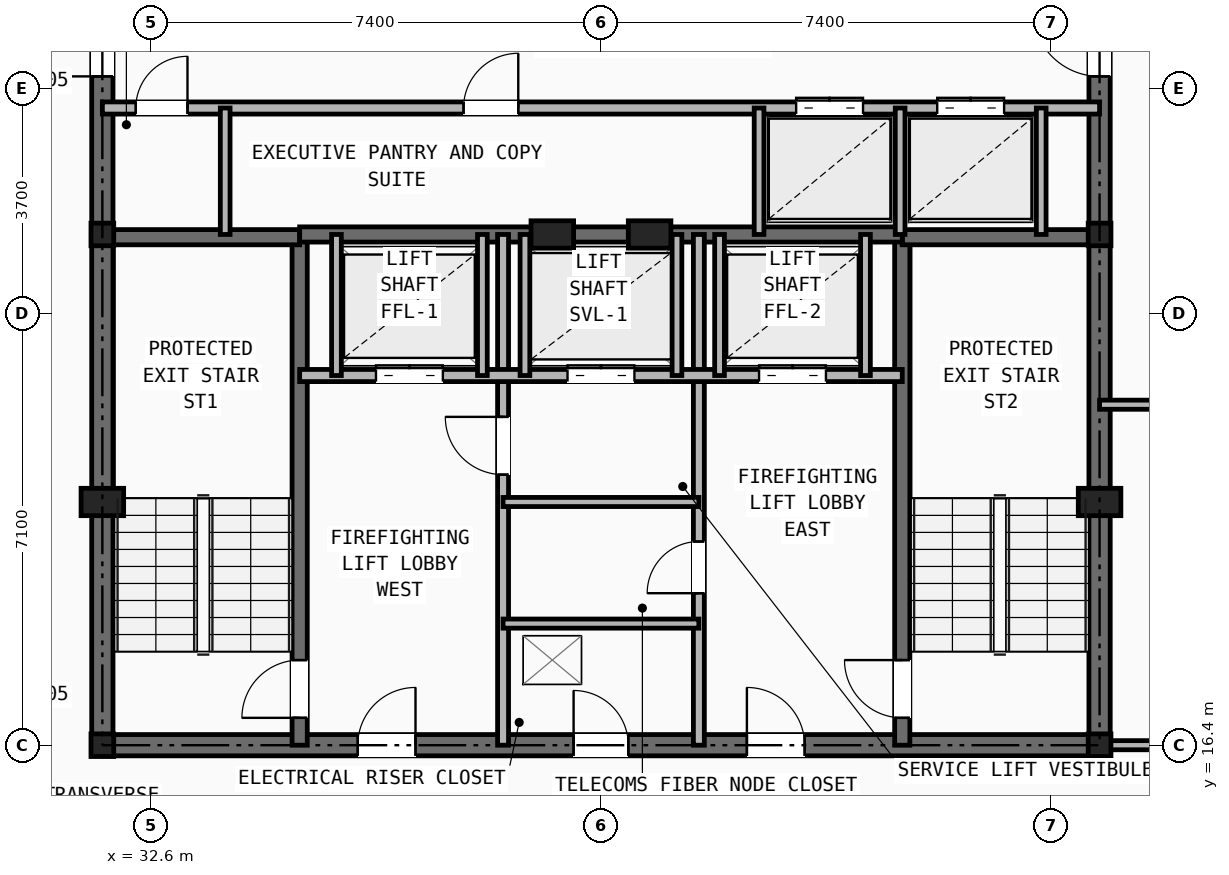
"""IFC4 building model, lengths in metres.
Left out: names, types, materials, properties, quantities, classifications, styles, units other than length and angle.
Written with IfcOpenShell. Run it as: python <this file> out.ifc"""

import sys

from ifc_helpers import new_model, si_unit, direction, frame, frame_2d, origin, origin_2d, place, context, subcontext, project, spatial, rectangle, i_section, extrude, element, fill, save


model = new_model("IFC4")
c1 = context("Model", 3, precision=1e-05, world=origin(), true_north=direction((0.0, 1.0)))
c2 = subcontext(c1, "Body", "Model", "MODEL_VIEW")
j1 = project(units=[si_unit("LENGTHUNIT", "METRE"), si_unit("PLANEANGLEUNIT", "RADIAN")], contexts=[c1])
p1 = place(None, origin())
s1 = spatial("IfcSite", under=j1, at=p1, CompositionType="ELEMENT")
p2 = place(p1, origin())
s2 = spatial("IfcBuilding", under=s1, at=p2, CompositionType="ELEMENT")
p3 = place(p2, frame((0.0, 0.0, 222.4)))
s3 = spatial("IfcBuildingStorey", under=s2, at=p3, CompositionType="ELEMENT", Elevation=222.4)
for number, where, z_axis, x_axis in (
    (1, (31.8, 16.4, 0.0), (0.0, 0.0, 1.0), (1.0, 0.0, 0.0)),
    (2, (48.2, 16.4, 0.0), (0.0, 0.0, 1.0), (1.0, 0.0, 0.0)),
    (3, (31.8, 24.8, 0.0), (0.0, 0.0, 1.0), (1.0, 0.0, 0.0)),
    (4, (48.2, 24.8, 0.0), (0.0, 0.0, 1.0), (1.0, 0.0, 0.0)),
):
    element("IfcColumn", number, at=place(p3, frame(where, z_axis=z_axis, x_axis=x_axis)), inside=s3, PredefinedType="COLUMN", context=c2, shape_type="SweptSolid", body=[
        extrude(i_section(OverallWidth=0.374, OverallDepth=0.372, WebThickness=0.016, FlangeThickness=0.026, at=origin_2d()), origin(), (0.0, 0.0, 1.0), 3.5),
    ])
for number, where, z_axis, x_axis in (
    (5, (31.8, 20.4, 0.0), (0.0, 0.0, 1.0), (1.0, 0.0, 0.0)),
    (6, (48.2, 20.4, 0.0), (0.0, 0.0, 1.0), (1.0, 0.0, 0.0)),
    (7, (39.2, 24.8, 0.0), (0.0, 0.0, 1.0), (1.0, 0.0, 0.0)),
    (8, (40.8, 24.8, 0.0), (0.0, 0.0, 1.0), (1.0, 0.0, 0.0)),
):
    element("IfcColumn", number, at=place(p3, frame(where, z_axis=z_axis, x_axis=x_axis)), inside=s3, PredefinedType="PILASTER", context=c2, shape_type="SweptSolid", body=[
        extrude(rectangle(XDim=0.7, YDim=0.45, at=origin_2d()), origin(), (0.0, 0.0, 1.0), 3.5),
    ])
p4 = place(p3, frame((31.8, 16.4, 0.0), z_axis=(0.0, 0.0, 1.0), x_axis=(1.0, 0.0, 0.0)))
e9 = element("IfcWall", 9, at=p4, inside=s3, PredefinedType="SHEAR", context=c2, shape_type="SweptSolid", body=[
    extrude(rectangle(XDim=16.4, YDim=0.35, at=frame_2d((8.2, 0.0))), origin(), (0.0, 0.0, 1.0), 3.25),
])
p5 = place(p4, frame((7.75, 0.0, 0.0)))
e10 = element("IfcOpeningElement", 10, at=p5, cuts=e9, PredefinedType="OPENING", context=c2, shape_type="SweptSolid", body=[
    extrude(rectangle(XDim=0.9, YDim=2.1, at=frame_2d((0.45, 1.05))), frame((0.0, 0.185, 0.0), z_axis=(0.0, -1.0, 0.0), x_axis=(1.0, 0.0, 0.0)), (0.0, 0.0, 1.0), 0.37),
])
p6 = place(p4, frame((4.2, 0.0, 0.0)))
e11 = element("IfcOpeningElement", 11, at=p6, cuts=e9, PredefinedType="OPENING", context=c2, shape_type="SweptSolid", body=[
    extrude(rectangle(XDim=0.95, YDim=2.1, at=frame_2d((0.475, 1.05))), frame((0.0, 0.185, 0.0), z_axis=(0.0, -1.0, 0.0), x_axis=(1.0, 0.0, 0.0)), (0.0, 0.0, 1.0), 0.37),
])
p7 = place(p4, frame((10.6, 0.0, 0.0)))
e12 = element("IfcOpeningElement", 12, at=p7, cuts=e9, PredefinedType="OPENING", context=c2, shape_type="SweptSolid", body=[
    extrude(rectangle(XDim=0.95, YDim=2.1, at=frame_2d((0.475, 1.05))), frame((0.0, 0.185, 0.0), z_axis=(0.0, -1.0, 0.0), x_axis=(1.0, 0.0, 0.0)), (0.0, 0.0, 1.0), 0.37),
])
p8 = place(p3, frame((31.8, 16.4, 0.0), z_axis=(0.0, 0.0, 1.0), x_axis=(0.0, 1.0, 0.0)))
e13 = element("IfcWall", 13, at=p8, inside=s3, PredefinedType="SHEAR", context=c2, shape_type="SweptSolid", body=[
    extrude(rectangle(XDim=14.8, YDim=0.35, at=frame_2d((7.4, 0.0))), origin(), (0.0, 0.0, 1.0), 3.25),
])
p9 = place(p8, frame((11.0, 0.0, 0.0)))
e14 = element("IfcOpeningElement", 14, at=p9, cuts=e13, PredefinedType="OPENING", context=c2, shape_type="SweptSolid", body=[
    extrude(rectangle(XDim=1.1, YDim=2.15, at=frame_2d((0.55, 1.075))), frame((0.0, 0.185, 0.0), z_axis=(0.0, -1.0, 0.0), x_axis=(1.0, 0.0, 0.0)), (0.0, 0.0, 1.0), 0.37),
])
p10 = place(p3, frame((48.2, 16.4, 0.0), z_axis=(0.0, 0.0, 1.0), x_axis=(0.0, 1.0, 0.0)))
e15 = element("IfcWall", 15, at=p10, inside=s3, PredefinedType="SHEAR", context=c2, shape_type="SweptSolid", body=[
    extrude(rectangle(XDim=14.8, YDim=0.35, at=frame_2d((7.4, 0.0))), origin(), (0.0, 0.0, 1.0), 3.25),
])
p11 = place(p10, frame((11.0, 0.0, 0.0)))
e16 = element("IfcOpeningElement", 16, at=p11, cuts=e15, PredefinedType="OPENING", context=c2, shape_type="SweptSolid", body=[
    extrude(rectangle(XDim=1.1, YDim=2.15, at=frame_2d((0.55, 1.075))), frame((0.0, 0.185, 0.0), z_axis=(0.0, -1.0, 0.0), x_axis=(1.0, 0.0, 0.0)), (0.0, 0.0, 1.0), 0.37),
])
p12 = place(p3, frame((35.045, 16.4, 0.0), z_axis=(0.0, 0.0, 1.0), x_axis=(0.0, 1.0, 0.0)))
e17 = element("IfcWall", 17, at=p12, inside=s3, PredefinedType="SHEAR", context=c2, shape_type="SweptSolid", body=[
    extrude(rectangle(XDim=8.4, YDim=0.25, at=frame_2d((4.2, 0.0))), origin(), (0.0, 0.0, 1.0), 3.25),
])
p13 = place(p12, frame((0.45, 0.0, 0.0)))
e18 = element("IfcOpeningElement", 18, at=p13, cuts=e17, PredefinedType="OPENING", context=c2, shape_type="SweptSolid", body=[
    extrude(rectangle(XDim=0.95, YDim=2.1, at=frame_2d((0.475, 1.05))), frame((0.0, 0.135, 0.0), z_axis=(0.0, -1.0, 0.0), x_axis=(1.0, 0.0, 0.0)), (0.0, 0.0, 1.0), 0.27),
])
p14 = place(p3, frame((31.8, 24.755, 0.0), z_axis=(0.0, 0.0, 1.0), x_axis=(1.0, 0.0, 0.0)))
e19 = element("IfcWall", 19, at=p14, inside=s3, PredefinedType="SHEAR", context=c2, shape_type="SweptSolid", body=[
    extrude(rectangle(XDim=3.245, YDim=0.25, at=frame_2d((1.623, 0.0))), origin(), (0.0, 0.0, 1.0), 3.25),
])
p15 = place(p3, frame((44.955, 16.4, 0.0), z_axis=(0.0, 0.0, 1.0), x_axis=(0.0, 1.0, 0.0)))
e20 = element("IfcWall", 20, at=p15, inside=s3, PredefinedType="SHEAR", context=c2, shape_type="SweptSolid", body=[
    extrude(rectangle(XDim=8.4, YDim=0.25, at=frame_2d((4.2, 0.0))), origin(), (0.0, 0.0, 1.0), 3.25),
])
p16 = place(p15, frame((0.45, 0.0, 0.0)))
e21 = element("IfcOpeningElement", 21, at=p16, cuts=e20, PredefinedType="OPENING", context=c2, shape_type="SweptSolid", body=[
    extrude(rectangle(XDim=0.95, YDim=2.1, at=frame_2d((0.475, 1.05))), frame((0.0, 0.135, 0.0), z_axis=(0.0, -1.0, 0.0), x_axis=(1.0, 0.0, 0.0)), (0.0, 0.0, 1.0), 0.27),
])
p17 = place(p3, frame((44.955, 24.755, 0.0), z_axis=(0.0, 0.0, 1.0), x_axis=(1.0, 0.0, 0.0)))
e22 = element("IfcWall", 22, at=p17, inside=s3, PredefinedType="SHEAR", context=c2, shape_type="SweptSolid", body=[
    extrude(rectangle(XDim=3.245, YDim=0.25, at=frame_2d((1.623, 0.0))), origin(), (0.0, 0.0, 1.0), 3.25),
])
p18 = place(p3, frame((35.045, 24.8, 0.0), z_axis=(0.0, 0.0, 1.0), x_axis=(1.0, 0.0, 0.0)))
e23 = element("IfcWall", 23, at=p18, inside=s3, PredefinedType="SHEAR", context=c2, shape_type="SweptSolid", body=[
    extrude(rectangle(XDim=9.91, YDim=0.25, at=frame_2d((4.955, 0.0))), origin(), (0.0, 0.0, 1.0), 3.25),
])
p19 = place(p3, frame((38.39, 16.4, 0.0), z_axis=(0.0, 0.0, 1.0), x_axis=(0.0, 1.0, 0.0)))
e24 = element("IfcWall", 24, at=p19, inside=s3, PredefinedType="PARTITIONING", context=c2, shape_type="SweptSolid", body=[
    extrude(rectangle(XDim=8.4, YDim=0.18, at=frame_2d((4.2, 0.0))), origin(), (0.0, 0.0, 1.0), 2.705),
])
p20 = place(p19, frame((4.45, 0.0, 0.0)))
e25 = element("IfcOpeningElement", 25, at=p20, cuts=e24, PredefinedType="OPENING", context=c2, shape_type="SweptSolid", body=[
    extrude(rectangle(XDim=0.95, YDim=2.1, at=frame_2d((0.475, 1.05))), frame((0.0, 0.1, 0.0), z_axis=(0.0, -1.0, 0.0), x_axis=(1.0, 0.0, 0.0)), (0.0, 0.0, 1.0), 0.2),
])
p21 = place(p3, frame((41.61, 16.4, 0.0), z_axis=(0.0, 0.0, 1.0), x_axis=(0.0, 1.0, 0.0)))
e26 = element("IfcWall", 26, at=p21, inside=s3, PredefinedType="PARTITIONING", context=c2, shape_type="SweptSolid", body=[
    extrude(rectangle(XDim=8.4, YDim=0.18, at=frame_2d((4.2, 0.0))), origin(), (0.0, 0.0, 1.0), 2.705),
])
p22 = place(p21, frame((2.5, 0.0, 0.0)))
e27 = element("IfcOpeningElement", 27, at=p22, cuts=e26, PredefinedType="OPENING", context=c2, shape_type="SweptSolid", body=[
    extrude(rectangle(XDim=0.85, YDim=2.05, at=frame_2d((0.425, 1.025))), frame((0.0, 0.1, 0.0), z_axis=(0.0, -1.0, 0.0), x_axis=(1.0, 0.0, 0.0)), (0.0, 0.0, 1.0), 0.2),
])
p23 = place(p3, frame((35.045, 22.48, 0.0), z_axis=(0.0, 0.0, 1.0), x_axis=(1.0, 0.0, 0.0)))
e28 = element("IfcWall", 28, at=p23, inside=s3, PredefinedType="SOLIDWALL", context=c2, shape_type="SweptSolid", body=[
    extrude(rectangle(XDim=9.91, YDim=0.2, at=frame_2d((4.955, 0.0))), origin(), (0.0, 0.0, 1.0), 3.25),
])
p24 = place(p23, frame((1.255, 0.0, 0.0)))
e29 = element("IfcOpeningElement", 29, at=p24, cuts=e28, PredefinedType="OPENING", context=c2, shape_type="SweptSolid", body=[
    extrude(rectangle(XDim=1.1, YDim=2.15, at=frame_2d((0.55, 1.075))), frame((0.0, 0.11, 0.0), z_axis=(0.0, -1.0, 0.0), x_axis=(1.0, 0.0, 0.0)), (0.0, 0.0, 1.0), 0.22),
])
p25 = place(p23, frame((7.555, 0.0, 0.0)))
e30 = element("IfcOpeningElement", 30, at=p25, cuts=e28, PredefinedType="OPENING", context=c2, shape_type="SweptSolid", body=[
    extrude(rectangle(XDim=1.1, YDim=2.15, at=frame_2d((0.55, 1.075))), frame((0.0, 0.11, 0.0), z_axis=(0.0, -1.0, 0.0), x_axis=(1.0, 0.0, 0.0)), (0.0, 0.0, 1.0), 0.22),
])
p26 = place(p23, frame((4.405, 0.0, 0.0)))
e31 = element("IfcOpeningElement", 31, at=p26, cuts=e28, PredefinedType="OPENING", context=c2, shape_type="SweptSolid", body=[
    extrude(rectangle(XDim=1.1, YDim=2.15, at=frame_2d((0.55, 1.075))), frame((0.0, 0.11, 0.0), z_axis=(0.0, -1.0, 0.0), x_axis=(1.0, 0.0, 0.0)), (0.0, 0.0, 1.0), 0.22),
])
for number, where, z_axis, x_axis in (
    (32, (38.39, 18.4, 0.0), (0.0, 0.0, 1.0), (1.0, 0.0, 0.0)),
    (33, (38.39, 20.4, 0.0), (0.0, 0.0, 1.0), (1.0, 0.0, 0.0)),
):
    element("IfcWall", number, at=place(p3, frame(where, z_axis=z_axis, x_axis=x_axis)), inside=s3, PredefinedType="PARTITIONING", context=c2, shape_type="SweptSolid", body=[
        extrude(rectangle(XDim=3.22, YDim=0.15, at=frame_2d((1.61, 0.0))), origin(), (0.0, 0.0, 1.0), 3.25),
    ])
for number, where, z_axis, x_axis in (
    (34, (35.65, 22.48, 0.0), (0.0, 0.0, 1.0), (0.0, 1.0, 0.0)),
    (35, (38.05, 22.48, 0.0), (0.0, 0.0, 1.0), (0.0, 1.0, 0.0)),
    (36, (41.95, 22.48, 0.0), (0.0, 0.0, 1.0), (0.0, 1.0, 0.0)),
    (37, (44.35, 22.48, 0.0), (0.0, 0.0, 1.0), (0.0, 1.0, 0.0)),
    (38, (38.75, 22.48, 0.0), (0.0, 0.0, 1.0), (0.0, 1.0, 0.0)),
    (39, (41.25, 22.48, 0.0), (0.0, 0.0, 1.0), (0.0, 1.0, 0.0)),
):
    element("IfcWall", number, at=place(p3, frame(where, z_axis=z_axis, x_axis=x_axis)), inside=s3, PredefinedType="SOLIDWALL", context=c2, shape_type="SweptSolid", body=[
        extrude(rectangle(XDim=2.32, YDim=0.16, at=frame_2d((1.16, 0.0))), origin(), (0.0, 0.0, 1.0), 3.25),
    ])
p27 = place(p3, frame((31.8, 26.88, 0.0), z_axis=(0.0, 0.0, 1.0), x_axis=(1.0, 0.0, 0.0)))
e40 = element("IfcWall", 40, at=p27, inside=s3, PredefinedType="SOLIDWALL", context=c2, shape_type="SweptSolid", body=[
    extrude(rectangle(XDim=16.4, YDim=0.2, at=frame_2d((8.2, 0.0))), origin(), (0.0, 0.0, 1.0), 2.705),
])
p28 = place(p27, frame((0.55, 0.0, 0.0)))
e41 = element("IfcOpeningElement", 41, at=p28, cuts=e40, PredefinedType="OPENING", context=c2, shape_type="SweptSolid", body=[
    extrude(rectangle(XDim=0.85, YDim=2.05, at=frame_2d((0.425, 1.025))), frame((0.0, 0.11, 0.0), z_axis=(0.0, -1.0, 0.0), x_axis=(1.0, 0.0, 0.0)), (0.0, 0.0, 1.0), 0.22),
])
p29 = place(p27, frame((5.94, 0.0, 0.0)))
e42 = element("IfcOpeningElement", 42, at=p29, cuts=e40, PredefinedType="OPENING", context=c2, shape_type="SweptSolid", body=[
    extrude(rectangle(XDim=0.9, YDim=2.1, at=frame_2d((0.45, 1.05))), frame((0.0, 0.11, 0.0), z_axis=(0.0, -1.0, 0.0), x_axis=(1.0, 0.0, 0.0)), (0.0, 0.0, 1.0), 0.22),
])
p30 = place(p27, frame((11.41, 0.0, 0.0)))
e43 = element("IfcOpeningElement", 43, at=p30, cuts=e40, PredefinedType="OPENING", context=c2, shape_type="SweptSolid", body=[
    extrude(rectangle(XDim=1.1, YDim=2.15, at=frame_2d((0.55, 1.075))), frame((0.0, 0.11, 0.0), z_axis=(0.0, -1.0, 0.0), x_axis=(1.0, 0.0, 0.0)), (0.0, 0.0, 1.0), 0.22),
])
p31 = place(p27, frame((13.73, 0.0, 0.0)))
e44 = element("IfcOpeningElement", 44, at=p31, cuts=e40, PredefinedType="OPENING", context=c2, shape_type="SweptSolid", body=[
    extrude(rectangle(XDim=1.1, YDim=2.15, at=frame_2d((0.55, 1.075))), frame((0.0, 0.11, 0.0), z_axis=(0.0, -1.0, 0.0), x_axis=(1.0, 0.0, 0.0)), (0.0, 0.0, 1.0), 0.22),
])
for number, where, z_axis, x_axis in (
    (45, (33.82, 24.8, 0.0), (0.0, 0.0, 1.0), (0.0, 1.0, 0.0)),
    (46, (42.6, 24.8, 0.0), (0.0, 0.0, 1.0), (0.0, 1.0, 0.0)),
    (47, (44.92, 24.8, 0.0), (0.0, 0.0, 1.0), (0.0, 1.0, 0.0)),
    (48, (47.24, 24.8, 0.0), (0.0, 0.0, 1.0), (0.0, 1.0, 0.0)),
):
    element("IfcWall", number, at=place(p3, frame(where, z_axis=z_axis, x_axis=x_axis)), inside=s3, PredefinedType="SOLIDWALL", context=c2, shape_type="SweptSolid", body=[
        extrude(rectangle(XDim=2.08, YDim=0.16, at=frame_2d((1.04, 0.0))), origin(), (0.0, 0.0, 1.0), 3.25),
    ])
p32 = place(p3, frame((48.2, 16.4, 0.0), z_axis=(0.0, 0.0, 1.0), x_axis=(1.0, 0.0, 0.0)))
e49 = element("IfcWall", 49, at=p32, inside=s3, PredefinedType="PARTITIONING", context=c2, shape_type="SweptSolid", body=[
    extrude(rectangle(XDim=15.888, YDim=0.15, at=frame_2d((7.944, 0.0))), origin(), (0.0, 0.0, 1.0), 2.265),
])
p33 = place(p3, frame((48.2, 22.0, 0.0), z_axis=(0.0, 0.0, 1.0), x_axis=(1.0, 0.0, 0.0)))
e50 = element("IfcWall", 50, at=p33, inside=s3, PredefinedType="PARTITIONING", context=c2, shape_type="SweptSolid", body=[
    extrude(rectangle(XDim=12.052, YDim=0.15, at=frame_2d((6.026, 0.0))), origin(), (0.0, 0.0, 1.0), 2.265),
])
p34 = place(p33, frame((1.4, 0.0, 0.0)))
e51 = element("IfcOpeningElement", 51, at=p34, cuts=e50, PredefinedType="OPENING", context=c2, shape_type="SweptSolid", body=[
    extrude(rectangle(XDim=0.95, YDim=2.1, at=frame_2d((0.475, 1.05))), frame((0.0, 0.085, 0.0), z_axis=(0.0, -1.0, 0.0), x_axis=(1.0, 0.0, 0.0)), (0.0, 0.0, 1.0), 0.17),
])
p35 = place(p5, origin())
e52 = element("IfcDoor", 52, at=p35, inside=s3, OperationType="SINGLE_SWING_LEFT", PredefinedType="DOOR", context=c2, shape_type="SweptSolid", body=[
    extrude(rectangle(XDim=0.9, YDim=2.1, at=frame_2d((0.45, 1.05))), frame((0.0, 0.025, 0.0), z_axis=(0.0, -1.0, 0.0), x_axis=(1.0, 0.0, 0.0)), (0.0, 0.0, 1.0), 0.05),
])
fill(e10, e52)
p36 = place(p22, origin())
e53 = element("IfcDoor", 53, at=p36, inside=s3, OperationType="SINGLE_SWING_LEFT", PredefinedType="DOOR", context=c2, shape_type="SweptSolid", body=[
    extrude(rectangle(XDim=0.85, YDim=2.05, at=frame_2d((0.425, 1.025))), frame((0.0, 0.025, 0.0), z_axis=(0.0, -1.0, 0.0), x_axis=(1.0, 0.0, 0.0)), (0.0, 0.0, 1.0), 0.05),
])
fill(e27, e53)
p37 = place(p20, origin())
e54 = element("IfcDoor", 54, at=p37, inside=s3, OperationType="SINGLE_SWING_RIGHT", PredefinedType="DOOR", context=c2, shape_type="SweptSolid", body=[
    extrude(rectangle(XDim=0.95, YDim=2.1, at=frame_2d((0.475, 1.05))), frame((0.0, 0.025, 0.0), z_axis=(0.0, -1.0, 0.0), x_axis=(1.0, 0.0, 0.0)), (0.0, 0.0, 1.0), 0.05),
])
fill(e25, e54)
p38 = place(p13, origin())
e55 = element("IfcDoor", 55, at=p38, inside=s3, OperationType="SINGLE_SWING_LEFT", PredefinedType="DOOR", context=c2, shape_type="SweptSolid", body=[
    extrude(rectangle(XDim=0.95, YDim=2.1, at=frame_2d((0.475, 1.05))), frame((0.0, 0.025, 0.0), z_axis=(0.0, -1.0, 0.0), x_axis=(1.0, 0.0, 0.0)), (0.0, 0.0, 1.0), 0.05),
])
fill(e18, e55)
p39 = place(p16, origin())
e56 = element("IfcDoor", 56, at=p39, inside=s3, OperationType="SINGLE_SWING_RIGHT", PredefinedType="DOOR", context=c2, shape_type="SweptSolid", body=[
    extrude(rectangle(XDim=0.95, YDim=2.1, at=frame_2d((0.475, 1.05))), frame((0.0, 0.025, 0.0), z_axis=(0.0, -1.0, 0.0), x_axis=(1.0, 0.0, 0.0)), (0.0, 0.0, 1.0), 0.05),
])
fill(e21, e56)
p40 = place(p6, origin())
e57 = element("IfcDoor", 57, at=p40, inside=s3, OperationType="SINGLE_SWING_RIGHT", PredefinedType="DOOR", context=c2, shape_type="SweptSolid", body=[
    extrude(rectangle(XDim=0.95, YDim=2.1, at=frame_2d((0.475, 1.05))), frame((0.0, 0.025, 0.0), z_axis=(0.0, -1.0, 0.0), x_axis=(1.0, 0.0, 0.0)), (0.0, 0.0, 1.0), 0.05),
])
fill(e11, e57)
p41 = place(p7, origin())
e58 = element("IfcDoor", 58, at=p41, inside=s3, OperationType="SINGLE_SWING_LEFT", PredefinedType="DOOR", context=c2, shape_type="SweptSolid", body=[
    extrude(rectangle(XDim=0.95, YDim=2.1, at=frame_2d((0.475, 1.05))), frame((0.0, 0.025, 0.0), z_axis=(0.0, -1.0, 0.0), x_axis=(1.0, 0.0, 0.0)), (0.0, 0.0, 1.0), 0.05),
])
fill(e12, e58)
p42 = place(p24, origin())
e59 = element("IfcDoor", 59, at=p42, inside=s3, OperationType="DOUBLE_DOOR_SLIDING", PredefinedType="DOOR", context=c2, shape_type="SweptSolid", body=[
    extrude(rectangle(XDim=1.1, YDim=2.15, at=frame_2d((0.55, 1.075))), frame((0.0, 0.025, 0.0), z_axis=(0.0, -1.0, 0.0), x_axis=(1.0, 0.0, 0.0)), (0.0, 0.0, 1.0), 0.05),
])
fill(e29, e59)
p43 = place(p25, origin())
e60 = element("IfcDoor", 60, at=p43, inside=s3, OperationType="DOUBLE_DOOR_SLIDING", PredefinedType="DOOR", context=c2, shape_type="SweptSolid", body=[
    extrude(rectangle(XDim=1.1, YDim=2.15, at=frame_2d((0.55, 1.075))), frame((0.0, 0.025, 0.0), z_axis=(0.0, -1.0, 0.0), x_axis=(1.0, 0.0, 0.0)), (0.0, 0.0, 1.0), 0.05),
])
fill(e30, e60)
p44 = place(p26, origin())
e61 = element("IfcDoor", 61, at=p44, inside=s3, OperationType="DOUBLE_DOOR_SLIDING", PredefinedType="DOOR", context=c2, shape_type="SweptSolid", body=[
    extrude(rectangle(XDim=1.1, YDim=2.15, at=frame_2d((0.55, 1.075))), frame((0.0, 0.025, 0.0), z_axis=(0.0, -1.0, 0.0), x_axis=(1.0, 0.0, 0.0)), (0.0, 0.0, 1.0), 0.05),
])
fill(e31, e61)
p45 = place(p28, origin())
e62 = element("IfcDoor", 62, at=p45, inside=s3, OperationType="SINGLE_SWING_RIGHT", PredefinedType="DOOR", context=c2, shape_type="SweptSolid", body=[
    extrude(rectangle(XDim=0.85, YDim=2.05, at=frame_2d((0.425, 1.025))), frame((0.0, 0.025, 0.0), z_axis=(0.0, -1.0, 0.0), x_axis=(1.0, 0.0, 0.0)), (0.0, 0.0, 1.0), 0.05),
])
fill(e41, e62)
p46 = place(p9, origin())
e63 = element("IfcDoor", 63, at=p46, inside=s3, OperationType="SINGLE_SWING_LEFT", PredefinedType="DOOR", context=c2, shape_type="SweptSolid", body=[
    extrude(rectangle(XDim=1.1, YDim=2.15, at=frame_2d((0.55, 1.075))), frame((0.0, 0.025, 0.0), z_axis=(0.0, -1.0, 0.0), x_axis=(1.0, 0.0, 0.0)), (0.0, 0.0, 1.0), 0.05),
])
fill(e14, e63)
p47 = place(p11, origin())
e64 = element("IfcDoor", 64, at=p47, inside=s3, OperationType="SINGLE_SWING_RIGHT", PredefinedType="DOOR", context=c2, shape_type="SweptSolid", body=[
    extrude(rectangle(XDim=1.1, YDim=2.15, at=frame_2d((0.55, 1.075))), frame((0.0, 0.025, 0.0), z_axis=(0.0, -1.0, 0.0), x_axis=(1.0, 0.0, 0.0)), (0.0, 0.0, 1.0), 0.05),
])
fill(e16, e64)
p48 = place(p29, origin())
e65 = element("IfcDoor", 65, at=p48, inside=s3, OperationType="SINGLE_SWING_RIGHT", PredefinedType="DOOR", context=c2, shape_type="SweptSolid", body=[
    extrude(rectangle(XDim=0.9, YDim=2.1, at=frame_2d((0.45, 1.05))), frame((0.0, 0.025, 0.0), z_axis=(0.0, -1.0, 0.0), x_axis=(1.0, 0.0, 0.0)), (0.0, 0.0, 1.0), 0.05),
])
fill(e42, e65)
p49 = place(p30, origin())
e66 = element("IfcDoor", 66, at=p49, inside=s3, OperationType="DOUBLE_DOOR_SLIDING", PredefinedType="DOOR", context=c2, shape_type="SweptSolid", body=[
    extrude(rectangle(XDim=1.1, YDim=2.15, at=frame_2d((0.55, 1.075))), frame((0.0, 0.025, 0.0), z_axis=(0.0, -1.0, 0.0), x_axis=(1.0, 0.0, 0.0)), (0.0, 0.0, 1.0), 0.05),
])
fill(e43, e66)
p50 = place(p31, origin())
e67 = element("IfcDoor", 67, at=p50, inside=s3, OperationType="DOUBLE_DOOR_SLIDING", PredefinedType="DOOR", context=c2, shape_type="SweptSolid", body=[
    extrude(rectangle(XDim=1.1, YDim=2.15, at=frame_2d((0.55, 1.075))), frame((0.0, 0.025, 0.0), z_axis=(0.0, -1.0, 0.0), x_axis=(1.0, 0.0, 0.0)), (0.0, 0.0, 1.0), 0.05),
])
fill(e44, e67)
save(model, sys.argv[1])
